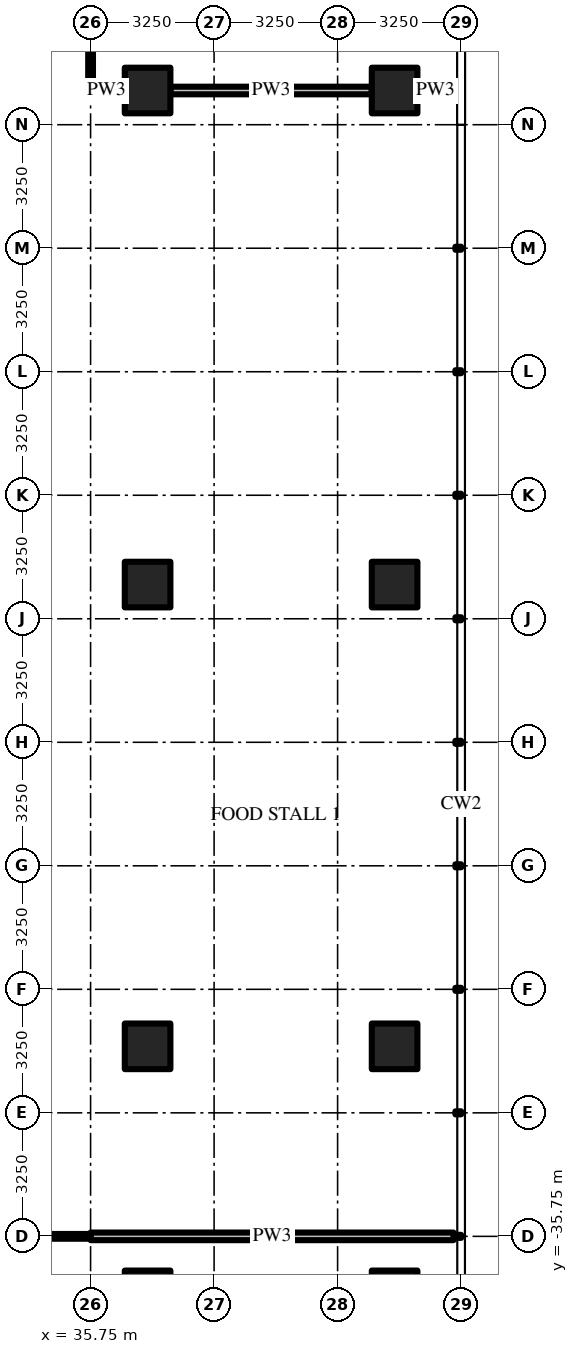
"""IFC4 building model, lengths in metres.
Left out: names, types, materials, properties, quantities, classifications, styles, units other than length and angle.
Written with IfcOpenShell. Run it as: python <this file> out.ifc"""

import sys

from ifc_helpers import new_model, si_unit, direction, frame, frame_2d, origin, origin_2d, place, context, subcontext, project, spatial, rectangle, extrude, source, transform, mapped, element, save


model = new_model("IFC4")
c1 = context("Model", 3, precision=1e-05, world=origin(), true_north=direction((0.0, 1.0)))
c2 = subcontext(c1, "Body", "Model", "MODEL_VIEW")
j1 = project(units=[si_unit("LENGTHUNIT", "METRE"), si_unit("PLANEANGLEUNIT", "RADIAN")], contexts=[c1])
p1 = place(None, origin())
s1 = spatial("IfcSite", under=j1, at=p1, CompositionType="ELEMENT")
p2 = place(p1, origin())
s2 = spatial("IfcBuilding", under=s1, at=p2, CompositionType="ELEMENT")
p3 = place(p2, frame((0.0, 0.0, 8.0)))
s3 = spatial("IfcBuildingStorey", under=s2, at=p3, CompositionType="ELEMENT", Elevation=8.0)
m1 = source(origin(), c2, "Body", "SweptSolid", [
    extrude(rectangle(XDim=1.2, YDim=1.2, at=origin_2d()), origin(), (0.0, 0.0, 1.0), 6.0),
])
for number, where, z_axis, x_axis in (
    (1, (37.25, -5.6, 0.0), (0.0, 0.0, 1.0), (1.0, 0.0, 0.0)),
    (2, (37.25, -18.6, 0.0), (0.0, 0.0, 1.0), (1.0, 0.0, 0.0)),
    (3, (37.25, -30.75, 0.0), (0.0, 0.0, 1.0), (1.0, 0.0, 0.0)),
    (4, (37.25, -37.25, 0.0), (0.0, 0.0, 1.0), (1.0, 0.0, 0.0)),
    (5, (43.75, -5.6, 0.0), (0.0, 0.0, 1.0), (1.0, 0.0, 0.0)),
    (6, (43.75, -18.6, 0.0), (0.0, 0.0, 1.0), (1.0, 0.0, 0.0)),
    (7, (43.75, -30.75, 0.0), (0.0, 0.0, 1.0), (1.0, 0.0, 0.0)),
    (8, (43.75, -37.25, 0.0), (0.0, 0.0, 1.0), (1.0, 0.0, 0.0)),
):
    element("IfcColumn", number, at=place(p3, frame(where, z_axis=z_axis, x_axis=x_axis)), inside=s3, PredefinedType="COLUMN", context=c2, shape_type="MappedRepresentation", body=[
        mapped(m1, transform((0.0, 0.0, 0.0))),
    ])
m2 = source(origin(), c2, "Body", "SweptSolid", [
    extrude(rectangle(XDim=5.4, YDim=0.125, at=frame_2d((2.7, 0.0))), origin(), (0.0, 0.0, 1.0), 4.997),
])
p4 = place(p3, frame((35.75, -0.1, 0.0), z_axis=(0.0, 0.0, 1.0), x_axis=(0.0, -1.0, 0.0)))
e9 = element("IfcWall", 9, at=p4, inside=s3, PredefinedType="PARTITIONING", context=c2, shape_type="MappedRepresentation", body=[
    mapped(m2, transform((0.0, 0.0, 0.0))),
])
m3 = source(origin(), c2, "Body", "SweptSolid", [
    extrude(rectangle(XDim=9.55, YDim=0.2, at=frame_2d((4.775, 0.0))), origin(), (0.0, 0.0, 1.0), 4.997),
])
p5 = place(p3, frame((35.75, -35.75, 0.0), z_axis=(0.0, 0.0, 1.0), x_axis=(1.0, 0.0, 0.0)))
e10 = element("IfcWall", 10, at=p5, inside=s3, PredefinedType="PARTITIONING", context=c2, shape_type="MappedRepresentation", body=[
    mapped(m3, transform((0.0, 0.0, 0.0))),
])
p6 = place(p3, frame((35.75, -35.75, 0.0), z_axis=(0.0, 0.0, 1.0), x_axis=(-1.0, 0.0, 0.0)))
e11 = element("IfcWall", 11, at=p6, inside=s3, PredefinedType="PARTITIONING", context=c2, shape_type="SweptSolid", body=[
    extrude(rectangle(XDim=35.85, YDim=0.125, at=frame_2d((17.925, 0.0))), origin(), (0.0, 0.0, 1.0), 4.997),
])
m4 = source(origin(), c2, "Body", "SweptSolid", [
    extrude(rectangle(XDim=1.2, YDim=2.1, at=frame_2d((0.6, 1.05))), frame((0.0, 0.073, 0.0), z_axis=(0.0, -1.0, 0.0), x_axis=(1.0, 0.0, 0.0)), (0.0, 0.0, 1.0), 0.145),
])
p7 = place(p6, frame((34.2, 0.0, 0.0)))
e12 = element("IfcOpeningElement", 12, at=p7, cuts=e11, PredefinedType="OPENING", context=c2, shape_type="MappedRepresentation", body=[
    mapped(m4, transform((0.0, 0.0, 0.0))),
])
m5 = source(origin(), c2, "Body", "SweptSolid", [
    extrude(rectangle(XDim=1.0, YDim=2.1, at=frame_2d((0.5, 1.05))), frame((0.0, 0.073, 0.0), z_axis=(0.0, -1.0, 0.0), x_axis=(1.0, 0.0, 0.0)), (0.0, 0.0, 1.0), 0.145),
])
p8 = place(p6, frame((21.4, 0.0, 0.0)))
e13 = element("IfcOpeningElement", 13, at=p8, cuts=e11, PredefinedType="OPENING", context=c2, shape_type="MappedRepresentation", body=[
    mapped(m5, transform((0.0, 0.0, 0.0))),
])
p9 = place(p6, frame((3.15, 0.0, 0.0)))
e14 = element("IfcOpeningElement", 14, at=p9, cuts=e11, PredefinedType="OPENING", context=c2, shape_type="MappedRepresentation", body=[
    mapped(m4, transform((0.0, 0.0, 0.0))),
])
m6 = source(origin(), c2, "Body", "SweptSolid", [
    extrude(rectangle(XDim=0.962, YDim=0.2, at=frame_2d((0.481, 0.0))), origin(), (0.0, 0.0, 1.0), 4.997),
])
p10 = place(p3, frame((35.688, -5.6, 0.0), z_axis=(0.0, 0.0, 1.0), x_axis=(1.0, 0.0, 0.0)))
e15 = element("IfcWall", 15, at=p10, inside=s3, PredefinedType="PARTITIONING", context=c2, shape_type="MappedRepresentation", body=[
    mapped(m6, transform((0.0, 0.0, 0.0))),
])
m7 = source(origin(), c2, "Body", "SweptSolid", [
    extrude(rectangle(XDim=5.3, YDim=0.2, at=frame_2d((2.65, 0.0))), origin(), (0.0, 0.0, 1.0), 4.997),
])
p11 = place(p3, frame((37.85, -5.6, 0.0), z_axis=(0.0, 0.0, 1.0), x_axis=(1.0, 0.0, 0.0)))
e16 = element("IfcWall", 16, at=p11, inside=s3, PredefinedType="PARTITIONING", context=c2, shape_type="MappedRepresentation", body=[
    mapped(m7, transform((0.0, 0.0, 0.0))),
])
m8 = source(origin(), c2, "Body", "SweptSolid", [
    extrude(rectangle(XDim=0.95, YDim=0.2, at=frame_2d((0.475, 0.0))), origin(), (0.0, 0.0, 1.0), 5.7),
])
p12 = place(p3, frame((44.35, -5.6, 0.0), z_axis=(0.0, 0.0, 1.0), x_axis=(1.0, 0.0, 0.0)))
e17 = element("IfcWall", 17, at=p12, inside=s3, PredefinedType="PARTITIONING", context=c2, shape_type="MappedRepresentation", body=[
    mapped(m8, transform((0.0, 0.0, 0.0))),
])
save(model, sys.argv[1])
